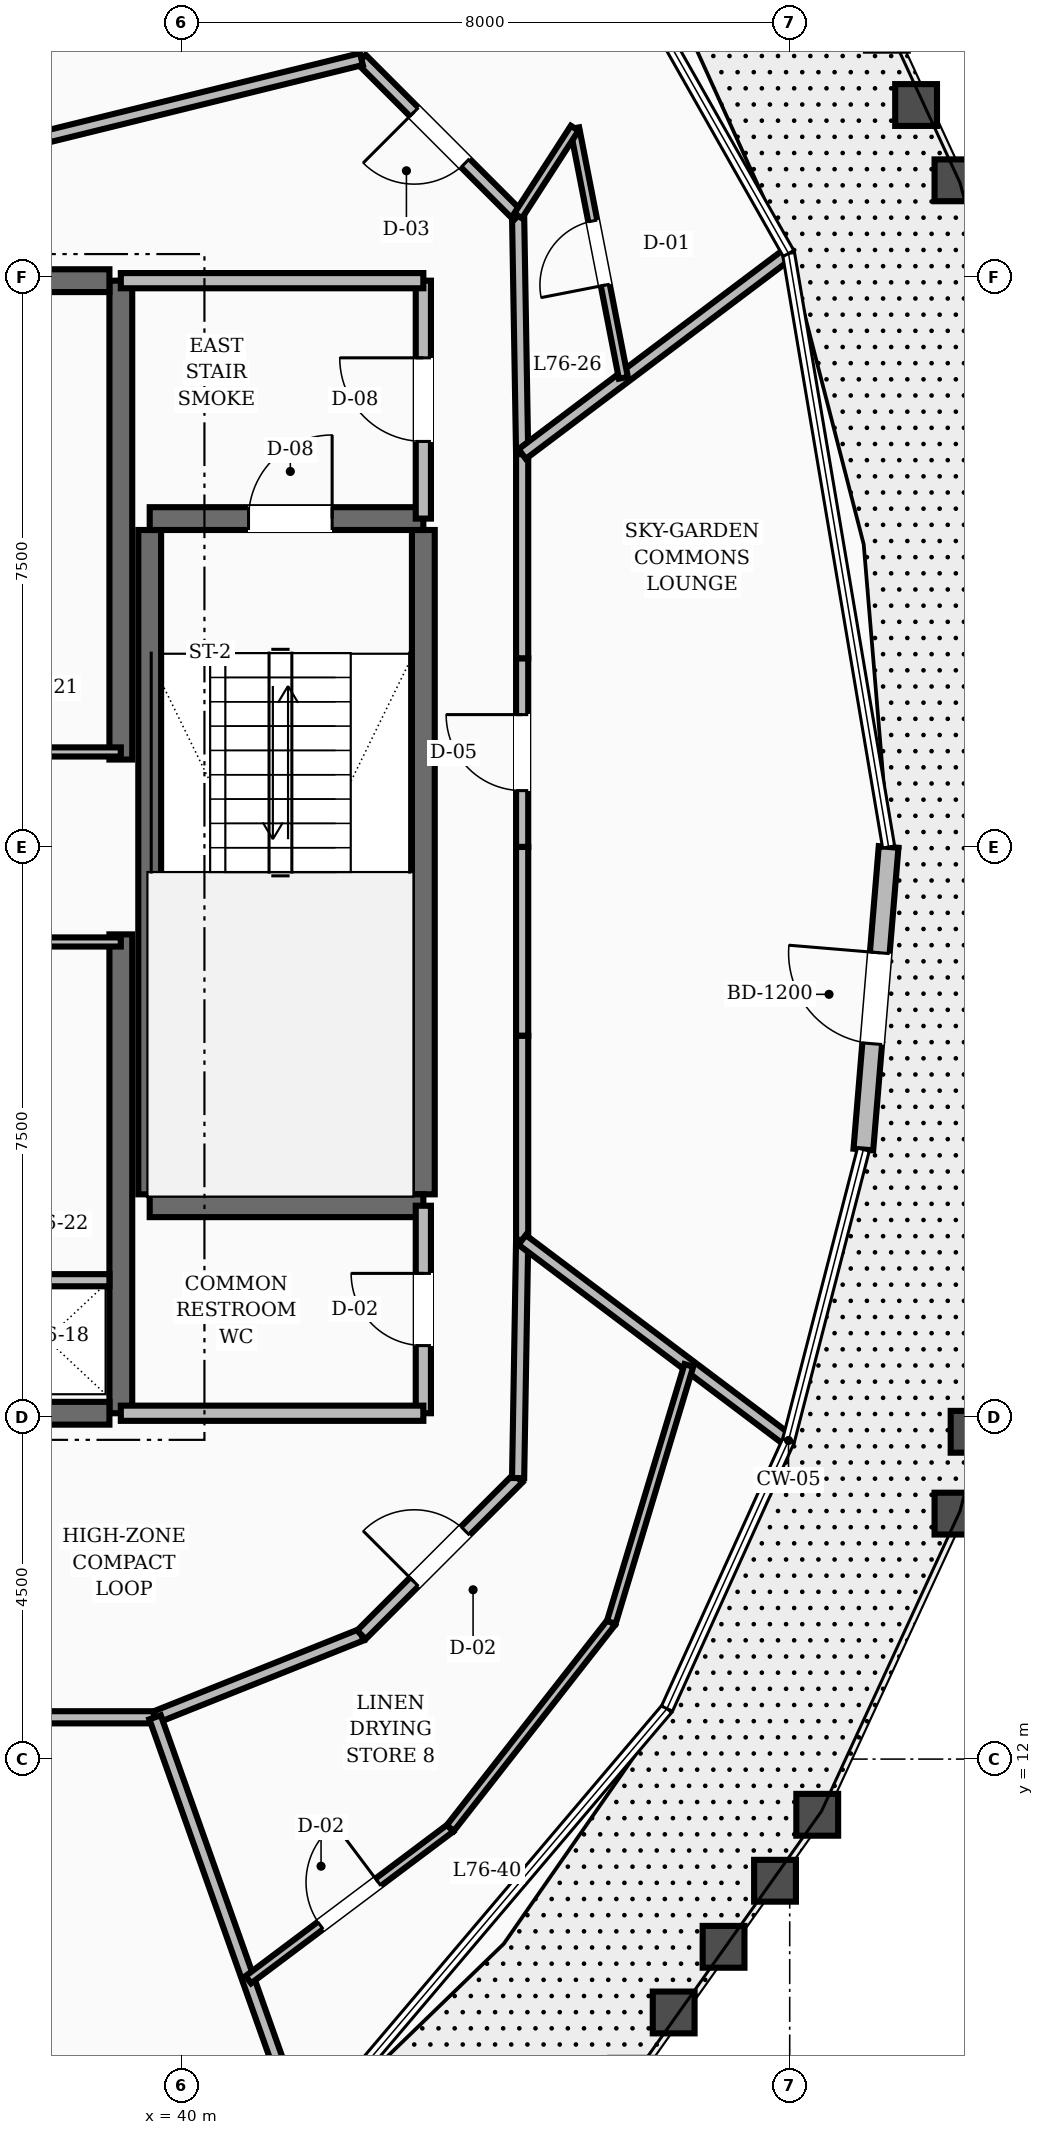
"""IFC4 building model, lengths in metres.
Left out: names, types, materials, properties, quantities, classifications, styles, units other than length and angle.
Written with IfcOpenShell. Run it as: python <this file> out.ifc"""

import sys

from ifc_helpers import new_model, si_unit, direction, frame, frame_2d, origin, place, context, subcontext, project, spatial, rectangle, extrude, element, fill, save


model = new_model("IFC4")
c1 = context("Model", 3, precision=1e-05, world=origin(), true_north=direction((0.0, 1.0)))
c2 = subcontext(c1, "Body", "Model", "MODEL_VIEW")
j1 = project(units=[si_unit("LENGTHUNIT", "METRE"), si_unit("PLANEANGLEUNIT", "RADIAN")], contexts=[c1])
p1 = place(None, origin())
s1 = spatial("IfcSite", under=j1, at=p1, CompositionType="ELEMENT")
p2 = place(p1, origin())
s2 = spatial("IfcBuilding", under=s1, at=p2, CompositionType="ELEMENT")
p3 = place(p2, frame((0.0, 0.0, 290.4)))
s3 = spatial("IfcBuildingStorey", under=s2, at=p3, CompositionType="ELEMENT", Elevation=290.4)
for number, where, z_axis, x_axis in (
    (1, (39.2, 16.55, 0.0), (0.0, 0.0, 1.0), (0.0, 1.0, 0.0)),
    (2, (39.2, 25.15, 0.0), (0.0, 0.0, 1.0), (0.0, 1.0, 0.0)),
):
    element("IfcWall", number, at=place(p3, frame(where, z_axis=z_axis, x_axis=x_axis)), inside=s3, PredefinedType="SHEAR", context=c2, shape_type="SweptSolid", body=[
        extrude(rectangle(XDim=6.3, YDim=0.3, at=frame_2d((3.15, 0.0))), origin(), (0.0, 0.0, 1.0), 3.6),
    ])
p4 = place(p3, frame((35.8, 16.55, 0.0), z_axis=(0.0, 0.0, 1.0), x_axis=(1.0, 0.0, 0.0)))
e3 = element("IfcWall", 3, at=p4, inside=s3, PredefinedType="SHEAR", context=c2, shape_type="SweptSolid", body=[
    extrude(rectangle(XDim=3.25, YDim=0.3, at=frame_2d((1.625, 0.0))), origin(), (0.0, 0.0, 1.0), 3.6),
])
p5 = place(p4, frame((0.3, 0.0, 0.0)))
e4 = element("IfcOpeningElement", 4, at=p5, cuts=e3, PredefinedType="OPENING", context=c2, shape_type="SweptSolid", body=[
    extrude(rectangle(XDim=1.1, YDim=2.1, at=frame_2d((0.55, 1.05))), frame((0.0, 0.16, 0.0), z_axis=(0.0, -1.0, 0.0), x_axis=(1.0, 0.0, 0.0)), (0.0, 0.0, 1.0), 0.32),
])
p6 = place(p3, frame((35.8, 31.45, 0.0), z_axis=(0.0, 0.0, 1.0), x_axis=(1.0, 0.0, 0.0)))
e5 = element("IfcWall", 5, at=p6, inside=s3, PredefinedType="SHEAR", context=c2, shape_type="SweptSolid", body=[
    extrude(rectangle(XDim=3.25, YDim=0.3, at=frame_2d((1.625, 0.0))), origin(), (0.0, 0.0, 1.0), 3.6),
])
p7 = place(p6, frame((0.3, 0.0, 0.0)))
e6 = element("IfcOpeningElement", 6, at=p7, cuts=e5, PredefinedType="OPENING", context=c2, shape_type="SweptSolid", body=[
    extrude(rectangle(XDim=1.1, YDim=2.1, at=frame_2d((0.55, 1.05))), frame((0.0, 0.16, 0.0), z_axis=(0.0, -1.0, 0.0), x_axis=(1.0, 0.0, 0.0)), (0.0, 0.0, 1.0), 0.32),
])
for number, where, z_axis, x_axis in (
    (7, (43.18, 19.43, 0.0), (0.0, 0.0, 1.0), (0.0, 1.0, 0.0)),
    (8, (39.58, 19.43, 0.0), (0.0, 0.0, 1.0), (0.0, 1.0, 0.0)),
):
    element("IfcWall", number, at=place(p3, frame(where, z_axis=z_axis, x_axis=x_axis)), inside=s3, PredefinedType="SHEAR", context=c2, shape_type="SweptSolid", body=[
        extrude(rectangle(XDim=8.74, YDim=0.3, at=frame_2d((4.37, 0.0))), origin(), (0.0, 0.0, 1.0), 3.6),
    ])
p8 = place(p3, frame((39.58, 19.28, 0.0), z_axis=(0.0, 0.0, 1.0), x_axis=(1.0, 0.0, 0.0)))
e9 = element("IfcWall", 9, at=p8, inside=s3, PredefinedType="SHEAR", context=c2, shape_type="SweptSolid", body=[
    extrude(rectangle(XDim=3.6, YDim=0.3, at=frame_2d((1.8, 0.0))), origin(), (0.0, 0.0, 1.0), 3.6),
])
p9 = place(p3, frame((39.58, 28.32, 0.0), z_axis=(0.0, 0.0, 1.0), x_axis=(1.0, 0.0, 0.0)))
e10 = element("IfcWall", 10, at=p9, inside=s3, PredefinedType="SHEAR", context=c2, shape_type="SweptSolid", body=[
    extrude(rectangle(XDim=3.6, YDim=0.3, at=frame_2d((1.8, 0.0))), origin(), (0.0, 0.0, 1.0), 3.6),
])
p10 = place(p9, frame((1.3, 0.0, 0.0)))
e11 = element("IfcOpeningElement", 11, at=p10, cuts=e10, PredefinedType="OPENING", context=c2, shape_type="SweptSolid", body=[
    extrude(rectangle(XDim=1.1, YDim=2.1, at=frame_2d((0.55, 1.05))), frame((0.0, 0.16, 0.0), z_axis=(0.0, -1.0, 0.0), x_axis=(1.0, 0.0, 0.0)), (0.0, 0.0, 1.0), 0.32),
])
p11 = place(p3, frame((48.969, 20.019, 0.0), z_axis=(0.0, 0.0, 1.0), x_axis=(0.083182046928, 0.996534368233, 0.0)))
e12 = element("IfcWall", 12, at=p11, inside=s3, PredefinedType="STANDARD", context=c2, shape_type="SweptSolid", body=[
    extrude(rectangle(XDim=3.995, YDim=0.26, at=frame_2d((1.997, 0.0))), origin(), (0.0, 0.0, 1.0), 2.88),
])
p12 = place(p11, frame((1.397, 0.0, 0.0)))
e13 = element("IfcOpeningElement", 13, at=p12, cuts=e12, PredefinedType="OPENING", context=c2, shape_type="SweptSolid", body=[
    extrude(rectangle(XDim=1.2, YDim=2.15, at=frame_2d((0.6, 1.075))), frame((0.0, 0.14, 0.0), z_axis=(0.0, -1.0, 0.0), x_axis=(1.0, 0.0, 0.0)), (0.0, 0.0, 1.0), 0.28),
])
p13 = place(p3, frame((43.18, 28.32, 0.0), z_axis=(0.0, 0.0, 1.0), x_axis=(0.0, 1.0, 0.0)))
e14 = element("IfcWall", 14, at=p13, inside=s3, PredefinedType="SOLIDWALL", context=c2, shape_type="SweptSolid", body=[
    extrude(rectangle(XDim=3.13, YDim=0.2, at=frame_2d((1.565, 0.0))), origin(), (0.0, 0.0, 1.0), 2.87),
])
p14 = place(p13, frame((1.015, 0.0, 0.0)))
e15 = element("IfcOpeningElement", 15, at=p14, cuts=e14, PredefinedType="OPENING", context=c2, shape_type="SweptSolid", body=[
    extrude(rectangle(XDim=1.1, YDim=2.1, at=frame_2d((0.55, 1.05))), frame((0.0, 0.11, 0.0), z_axis=(0.0, -1.0, 0.0), x_axis=(1.0, 0.0, 0.0)), (0.0, 0.0, 1.0), 0.22),
])
p15 = place(p3, frame((39.2, 31.45, 0.0), z_axis=(0.0, 0.0, 1.0), x_axis=(1.0, 0.0, 0.0)))
e16 = element("IfcWall", 16, at=p15, inside=s3, PredefinedType="SOLIDWALL", context=c2, shape_type="SweptSolid", body=[
    extrude(rectangle(XDim=3.98, YDim=0.2, at=frame_2d((1.99, 0.0))), origin(), (0.0, 0.0, 1.0), 2.87),
])
p16 = place(p3, frame((43.18, 16.55, 0.0), z_axis=(0.0, 0.0, 1.0), x_axis=(0.0, 1.0, 0.0)))
e17 = element("IfcWall", 17, at=p16, inside=s3, PredefinedType="SOLIDWALL", context=c2, shape_type="SweptSolid", body=[
    extrude(rectangle(XDim=2.73, YDim=0.2, at=frame_2d((1.365, 0.0))), origin(), (0.0, 0.0, 1.0), 2.87),
])
p17 = place(p16, frame((0.89, 0.0, 0.0)))
e18 = element("IfcOpeningElement", 18, at=p17, cuts=e17, PredefinedType="OPENING", context=c2, shape_type="SweptSolid", body=[
    extrude(rectangle(XDim=0.95, YDim=2.1, at=frame_2d((0.475, 1.05))), frame((0.0, 0.11, 0.0), z_axis=(0.0, -1.0, 0.0), x_axis=(1.0, 0.0, 0.0)), (0.0, 0.0, 1.0), 0.22),
])
p18 = place(p3, frame((39.2, 16.55, 0.0), z_axis=(0.0, 0.0, 1.0), x_axis=(1.0, 0.0, 0.0)))
e19 = element("IfcWall", 19, at=p18, inside=s3, PredefinedType="SOLIDWALL", context=c2, shape_type="SweptSolid", body=[
    extrude(rectangle(XDim=3.98, YDim=0.2, at=frame_2d((1.99, 0.0))), origin(), (0.0, 0.0, 1.0), 2.87),
])
p19 = place(p3, frame((37.4, 18.3, 0.0), z_axis=(0.0, 0.0, 1.0), x_axis=(1.0, 0.0, 0.0)))
e20 = element("IfcWall", 20, at=p19, inside=s3, PredefinedType="SOLIDWALL", context=c2, shape_type="SweptSolid", body=[
    extrude(rectangle(XDim=1.65, YDim=0.16, at=frame_2d((0.825, 0.0))), origin(), (0.0, 0.0, 1.0), 2.87),
])
for number, where, z_axis, x_axis in (
    (21, (37.4, 25.25, 0.0), (0.0, 0.0, 1.0), (1.0, 0.0, 0.0)),
    (22, (37.4, 22.75, 0.0), (0.0, 0.0, 1.0), (1.0, 0.0, 0.0)),
):
    element("IfcWall", number, at=place(p3, frame(where, z_axis=z_axis, x_axis=x_axis)), inside=s3, PredefinedType="PARTITIONING", context=c2, shape_type="SweptSolid", body=[
        extrude(rectangle(XDim=1.8, YDim=0.12, at=frame_2d((0.9, 0.0))), origin(), (0.0, 0.0, 1.0), 2.87),
    ])
p20 = place(p3, frame((44.48, 24.0, 0.0), z_axis=(0.0, 0.0, 1.0), x_axis=(0.0, 1.0, 0.0)))
e23 = element("IfcWall", 23, at=p20, inside=s3, PredefinedType="SOLIDWALL", context=c2, shape_type="SweptSolid", body=[
    extrude(rectangle(XDim=2.482, YDim=0.16, at=frame_2d((1.241, 0.0))), origin(), (0.0, 0.0, 1.0), 2.87),
])
p21 = place(p20, frame((0.741, 0.0, 0.0)))
e24 = element("IfcOpeningElement", 24, at=p21, cuts=e23, PredefinedType="OPENING", context=c2, shape_type="SweptSolid", body=[
    extrude(rectangle(XDim=1.0, YDim=2.1, at=frame_2d((0.5, 1.05))), frame((0.0, 0.09, 0.0), z_axis=(0.0, -1.0, 0.0), x_axis=(1.0, 0.0, 0.0)), (0.0, 0.0, 1.0), 0.18),
])
p22 = place(p3, frame((44.48, 26.482, 0.0), z_axis=(0.0, 0.0, 1.0), x_axis=(0.0, 1.0, 0.0)))
e25 = element("IfcWall", 25, at=p22, inside=s3, PredefinedType="SOLIDWALL", context=c2, shape_type="SweptSolid", body=[
    extrude(rectangle(XDim=2.687, YDim=0.16, at=frame_2d((1.344, 0.0))), origin(), (0.0, 0.0, 1.0), 2.87),
])
p23 = place(p3, frame((44.48, 29.169, 0.0), z_axis=(0.0, 0.0, 1.0), x_axis=(-0.016981035134, 0.999855811828, 0.0)))
e26 = element("IfcWall", 26, at=p23, inside=s3, PredefinedType="SOLIDWALL", context=c2, shape_type="SweptSolid", body=[
    extrude(rectangle(XDim=3.134, YDim=0.16, at=frame_2d((1.567, 0.0))), origin(), (0.0, 0.0, 1.0), 2.87),
])
p24 = place(p3, frame((44.427, 32.303, 0.0), z_axis=(0.0, 0.0, 1.0), x_axis=(-0.707106781187, 0.707106781187, 0.0)))
e27 = element("IfcWall", 27, at=p24, inside=s3, PredefinedType="SOLIDWALL", context=c2, shape_type="SweptSolid", body=[
    extrude(rectangle(XDim=2.916, YDim=0.16, at=frame_2d((1.458, 0.0))), origin(), (0.0, 0.0, 1.0), 2.87),
])
p25 = place(p24, frame((0.983, 0.0, 0.0)))
e28 = element("IfcOpeningElement", 28, at=p25, cuts=e27, PredefinedType="OPENING", context=c2, shape_type="SweptSolid", body=[
    extrude(rectangle(XDim=0.95, YDim=2.1, at=frame_2d((0.475, 1.05))), frame((0.0, 0.09, 0.0), z_axis=(0.0, -1.0, 0.0), x_axis=(1.0, 0.0, 0.0)), (0.0, 0.0, 1.0), 0.18),
])
p26 = place(p3, frame((42.365, 34.365, 0.0), z_axis=(0.0, 0.0, 1.0), x_axis=(-0.970939799552, -0.239323850978, 0.0)))
e29 = element("IfcWall", 29, at=p26, inside=s3, PredefinedType="SOLIDWALL", context=c2, shape_type="SweptSolid", body=[
    extrude(rectangle(XDim=4.241, YDim=0.16, at=frame_2d((2.12, 0.0))), origin(), (0.0, 0.0, 1.0), 2.87),
])
p27 = place(p3, frame((36.743, 12.55, 0.0), z_axis=(0.0, 0.0, 1.0), x_axis=(1.0, 0.0, 0.0)))
e30 = element("IfcWall", 30, at=p27, inside=s3, PredefinedType="SOLIDWALL", context=c2, shape_type="SweptSolid", body=[
    extrude(rectangle(XDim=2.908, YDim=0.16, at=frame_2d((1.454, 0.0))), origin(), (0.0, 0.0, 1.0), 2.87),
])
p28 = place(p3, frame((39.651, 12.55, 0.0), z_axis=(0.0, 0.0, 1.0), x_axis=(0.92856882165, 0.371160266542, 0.0)))
e31 = element("IfcWall", 31, at=p28, inside=s3, PredefinedType="SOLIDWALL", context=c2, shape_type="SweptSolid", body=[
    extrude(rectangle(XDim=2.923, YDim=0.16, at=frame_2d((1.461, 0.0))), origin(), (0.0, 0.0, 1.0), 2.87),
])
p29 = place(p3, frame((42.365, 13.635, 0.0), z_axis=(0.0, 0.0, 1.0), x_axis=(0.707106781187, 0.707106781187, 0.0)))
e32 = element("IfcWall", 32, at=p29, inside=s3, PredefinedType="SOLIDWALL", context=c2, shape_type="SweptSolid", body=[
    extrude(rectangle(XDim=2.916, YDim=0.16, at=frame_2d((1.458, 0.0))), origin(), (0.0, 0.0, 1.0), 2.87),
])
p30 = place(p29, frame((0.983, 0.0, 0.0)))
e33 = element("IfcOpeningElement", 33, at=p30, cuts=e32, PredefinedType="OPENING", context=c2, shape_type="SweptSolid", body=[
    extrude(rectangle(XDim=0.95, YDim=2.1, at=frame_2d((0.475, 1.05))), frame((0.0, 0.09, 0.0), z_axis=(0.0, -1.0, 0.0), x_axis=(1.0, 0.0, 0.0)), (0.0, 0.0, 1.0), 0.18),
])
p31 = place(p3, frame((44.427, 15.697, 0.0), z_axis=(0.0, 0.0, 1.0), x_axis=(0.016981035134, 0.999855811828, 0.0)))
e34 = element("IfcWall", 34, at=p31, inside=s3, PredefinedType="SOLIDWALL", context=c2, shape_type="SweptSolid", body=[
    extrude(rectangle(XDim=3.134, YDim=0.16, at=frame_2d((1.567, 0.0))), origin(), (0.0, 0.0, 1.0), 2.87),
])
p32 = place(p3, frame((44.48, 18.831, 0.0), z_axis=(0.0, 0.0, 1.0), x_axis=(0.0, 1.0, 0.0)))
e35 = element("IfcWall", 35, at=p32, inside=s3, PredefinedType="SOLIDWALL", context=c2, shape_type="SweptSolid", body=[
    extrude(rectangle(XDim=2.687, YDim=0.16, at=frame_2d((1.344, 0.0))), origin(), (0.0, 0.0, 1.0), 2.87),
])
p33 = place(p3, frame((44.48, 21.518, 0.0), z_axis=(0.0, 0.0, 1.0), x_axis=(0.0, 1.0, 0.0)))
e36 = element("IfcWall", 36, at=p33, inside=s3, PredefinedType="SOLIDWALL", context=c2, shape_type="SweptSolid", body=[
    extrude(rectangle(XDim=2.482, YDim=0.16, at=frame_2d((1.241, 0.0))), origin(), (0.0, 0.0, 1.0), 2.87),
])
for number, where, z_axis, x_axis in (
    (37, (44.48, 18.831, 0.0), (0.0, 0.0, 1.0), (0.799, -0.602, 0.0)),
    (38, (44.48, 29.169, 0.0), (0.0, 0.0, 1.0), (0.799, 0.602, 0.0)),
):
    element("IfcWall", number, at=place(p3, frame(where, z_axis=z_axis, x_axis=x_axis)), inside=s3, PredefinedType="SOLIDWALL", context=c2, shape_type="SweptSolid", body=[
        extrude(rectangle(XDim=4.337, YDim=0.16, at=frame_2d((2.168, 0.0))), origin(), (0.0, 0.0, 1.0), 2.87),
    ])
p34 = place(p3, frame((45.812, 30.172, 0.0), z_axis=(0.0, 0.0, 1.0), x_axis=(-0.191482926261, 0.981495944439, 0.0)))
e39 = element("IfcWall", 39, at=p34, inside=s3, PredefinedType="PARTITIONING", context=c2, shape_type="SweptSolid", body=[
    extrude(rectangle(XDim=3.346, YDim=0.12, at=frame_2d((1.673, 0.0))), origin(), (0.0, 0.0, 1.0), 2.87),
])
p35 = place(p34, frame((1.243, 0.0, 0.0)))
e40 = element("IfcOpeningElement", 40, at=p35, cuts=e39, PredefinedType="OPENING", context=c2, shape_type="SweptSolid", body=[
    extrude(rectangle(XDim=0.86, YDim=2.1, at=frame_2d((0.43, 1.05))), frame((0.0, 0.07, 0.0), z_axis=(0.0, -1.0, 0.0), x_axis=(1.0, 0.0, 0.0)), (0.0, 0.0, 1.0), 0.14),
])
p36 = place(p3, frame((44.427, 32.303, 0.0), z_axis=(0.0, 0.0, 1.0), x_axis=(0.542402466018, 0.840118780207, 0.0)))
e41 = element("IfcWall", 41, at=p36, inside=s3, PredefinedType="PARTITIONING", context=c2, shape_type="SweptSolid", body=[
    extrude(rectangle(XDim=1.372, YDim=0.12, at=frame_2d((0.686, 0.0))), origin(), (0.0, 0.0, 1.0), 2.87),
])
p37 = place(p3, frame((35.873, 33.35, 0.0), z_axis=(0.0, 0.0, 1.0), x_axis=(0.283560622835, 0.958954312351, 0.0)))
e42 = element("IfcWall", 42, at=p37, inside=s3, PredefinedType="SOLIDWALL", context=c2, shape_type="SweptSolid", body=[
    extrude(rectangle(XDim=10.397, YDim=0.16, at=frame_2d((5.199, 0.0))), origin(), (0.0, 0.0, 1.0), 2.87),
])
p38 = place(p3, frame((39.651, 12.55, 0.0), z_axis=(0.0, 0.0, 1.0), x_axis=(0.335043691545, -0.942202592204, 0.0)))
e43 = element("IfcWall", 43, at=p38, inside=s3, PredefinedType="SOLIDWALL", context=c2, shape_type="SweptSolid", body=[
    extrude(rectangle(XDim=5.804, YDim=0.16, at=frame_2d((2.902, 0.0))), origin(), (0.0, 0.0, 1.0), 2.87),
])
p39 = place(p3, frame((40.878, 9.098, 0.0), z_axis=(0.0, 0.0, 1.0), x_axis=(0.79971765819, 0.600376271332, 0.0)))
e44 = element("IfcWall", 44, at=p39, inside=s3, PredefinedType="PARTITIONING", context=c2, shape_type="SweptSolid", body=[
    extrude(rectangle(XDim=3.322, YDim=0.12, at=frame_2d((1.661, 0.0))), origin(), (0.0, 0.0, 1.0), 2.87),
])
p40 = place(p39, frame((1.186, 0.0, 0.0)))
e45 = element("IfcOpeningElement", 45, at=p40, cuts=e44, PredefinedType="OPENING", context=c2, shape_type="SweptSolid", body=[
    extrude(rectangle(XDim=0.95, YDim=2.1, at=frame_2d((0.475, 1.05))), frame((0.0, 0.07, 0.0), z_axis=(0.0, -1.0, 0.0), x_axis=(1.0, 0.0, 0.0)), (0.0, 0.0, 1.0), 0.14),
])
p41 = place(p3, frame((43.535, 11.092, 0.0), z_axis=(0.0, 0.0, 1.0), x_axis=(0.616264204791, 0.787539478307, 0.0)))
e46 = element("IfcWall", 46, at=p41, inside=s3, PredefinedType="PARTITIONING", context=c2, shape_type="SweptSolid", body=[
    extrude(rectangle(XDim=3.437, YDim=0.12, at=frame_2d((1.718, 0.0))), origin(), (0.0, 0.0, 1.0), 2.87),
])
p42 = place(p3, frame((45.653, 13.799, 0.0), z_axis=(0.0, 0.0, 1.0), x_axis=(0.289009374278, 0.957326267048, 0.0)))
e47 = element("IfcWall", 47, at=p42, inside=s3, PredefinedType="PARTITIONING", context=c2, shape_type="SweptSolid", body=[
    extrude(rectangle(XDim=3.531, YDim=0.12, at=frame_2d((1.766, 0.0))), origin(), (0.0, 0.0, 1.0), 2.87),
])
p43 = place(p12, origin())
e48 = element("IfcDoor", 48, at=p43, inside=s3, OperationType="SINGLE_SWING_RIGHT", PredefinedType="DOOR", context=c2, shape_type="SweptSolid", body=[
    extrude(rectangle(XDim=1.2, YDim=2.15, at=frame_2d((0.6, 1.075))), frame((0.0, 0.025, 0.0), z_axis=(0.0, -1.0, 0.0), x_axis=(1.0, 0.0, 0.0)), (0.0, 0.0, 1.0), 0.05),
])
fill(e13, e48)
p44 = place(p10, origin())
e49 = element("IfcDoor", 49, at=p44, inside=s3, OperationType="SINGLE_SWING_RIGHT", PredefinedType="DOOR", context=c2, shape_type="SweptSolid", body=[
    extrude(rectangle(XDim=1.1, YDim=2.1, at=frame_2d((0.55, 1.05))), frame((0.0, 0.025, 0.0), z_axis=(0.0, -1.0, 0.0), x_axis=(1.0, 0.0, 0.0)), (0.0, 0.0, 1.0), 0.05),
])
fill(e11, e49)
p45 = place(p14, origin())
e50 = element("IfcDoor", 50, at=p45, inside=s3, OperationType="SINGLE_SWING_RIGHT", PredefinedType="DOOR", context=c2, shape_type="SweptSolid", body=[
    extrude(rectangle(XDim=1.1, YDim=2.1, at=frame_2d((0.55, 1.05))), frame((0.0, 0.025, 0.0), z_axis=(0.0, -1.0, 0.0), x_axis=(1.0, 0.0, 0.0)), (0.0, 0.0, 1.0), 0.05),
])
fill(e15, e50)
p46 = place(p17, origin())
e51 = element("IfcDoor", 51, at=p46, inside=s3, OperationType="SINGLE_SWING_RIGHT", PredefinedType="DOOR", context=c2, shape_type="SweptSolid", body=[
    extrude(rectangle(XDim=0.95, YDim=2.1, at=frame_2d((0.475, 1.05))), frame((0.0, 0.025, 0.0), z_axis=(0.0, -1.0, 0.0), x_axis=(1.0, 0.0, 0.0)), (0.0, 0.0, 1.0), 0.05),
])
fill(e18, e51)
p47 = place(p21, origin())
e52 = element("IfcDoor", 52, at=p47, inside=s3, OperationType="SINGLE_SWING_RIGHT", PredefinedType="DOOR", context=c2, shape_type="SweptSolid", body=[
    extrude(rectangle(XDim=1.0, YDim=2.1, at=frame_2d((0.5, 1.05))), frame((0.0, 0.025, 0.0), z_axis=(0.0, -1.0, 0.0), x_axis=(1.0, 0.0, 0.0)), (0.0, 0.0, 1.0), 0.05),
])
fill(e24, e52)
p48 = place(p35, origin())
e53 = element("IfcDoor", 53, at=p48, inside=s3, OperationType="SINGLE_SWING_LEFT", PredefinedType="DOOR", context=c2, shape_type="SweptSolid", body=[
    extrude(rectangle(XDim=0.86, YDim=2.1, at=frame_2d((0.43, 1.05))), frame((0.0, 0.025, 0.0), z_axis=(0.0, -1.0, 0.0), x_axis=(1.0, 0.0, 0.0)), (0.0, 0.0, 1.0), 0.05),
])
fill(e40, e53)
p49 = place(p25, origin())
e54 = element("IfcDoor", 54, at=p49, inside=s3, OperationType="SINGLE_SWING_RIGHT", PredefinedType="DOOR", context=c2, shape_type="SweptSolid", body=[
    extrude(rectangle(XDim=0.95, YDim=2.1, at=frame_2d((0.475, 1.05))), frame((0.0, 0.025, 0.0), z_axis=(0.0, -1.0, 0.0), x_axis=(1.0, 0.0, 0.0)), (0.0, 0.0, 1.0), 0.05),
])
fill(e28, e54)
p50 = place(p30, origin())
e55 = element("IfcDoor", 55, at=p50, inside=s3, OperationType="SINGLE_SWING_LEFT", PredefinedType="DOOR", context=c2, shape_type="SweptSolid", body=[
    extrude(rectangle(XDim=0.95, YDim=2.1, at=frame_2d((0.475, 1.05))), frame((0.0, 0.025, 0.0), z_axis=(0.0, -1.0, 0.0), x_axis=(1.0, 0.0, 0.0)), (0.0, 0.0, 1.0), 0.05),
])
fill(e33, e55)
p51 = place(p40, origin())
e56 = element("IfcDoor", 56, at=p51, inside=s3, OperationType="SINGLE_SWING_RIGHT", PredefinedType="DOOR", context=c2, shape_type="SweptSolid", body=[
    extrude(rectangle(XDim=0.95, YDim=2.1, at=frame_2d((0.475, 1.05))), frame((0.0, 0.025, 0.0), z_axis=(0.0, -1.0, 0.0), x_axis=(1.0, 0.0, 0.0)), (0.0, 0.0, 1.0), 0.05),
])
fill(e45, e56)
save(model, sys.argv[1])
